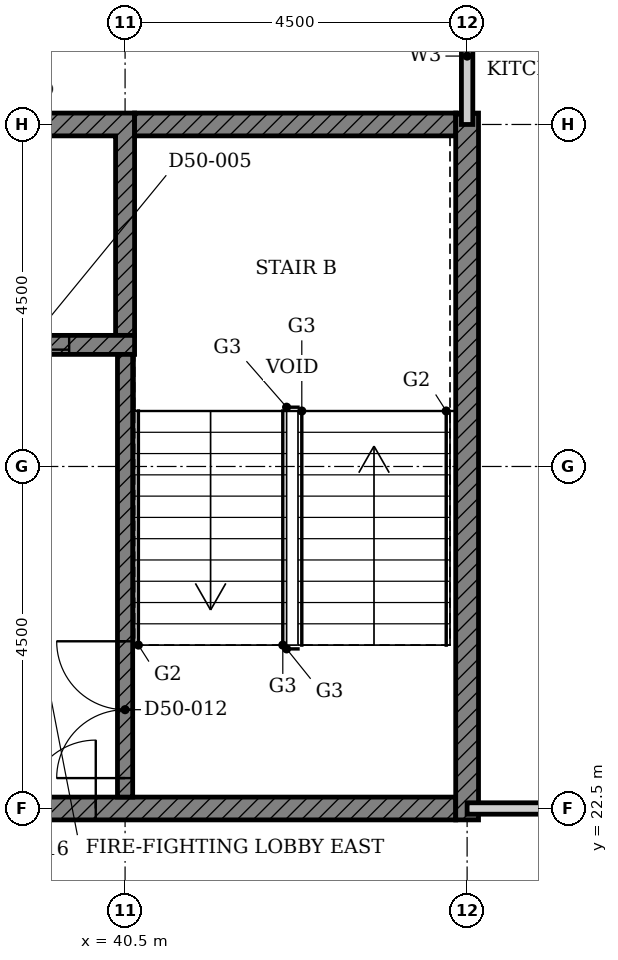
"""IFC4 building model, lengths in metres.
Left out: names, types, materials, properties, quantities, classifications, styles, units other than length and angle.
Written with IfcOpenShell. Run it as: python <this file> out.ifc"""

import sys

from ifc_helpers import new_model, si_unit, direction, frame, frame_2d, origin, place, context, subcontext, project, spatial, polyline, rectangle, outline, extrude, element, fill, save


model = new_model("IFC4")
c1 = context("Model", 3, precision=1e-05, world=origin(), true_north=direction((0.0, 1.0)))
c2 = subcontext(c1, "Body", "Model", "MODEL_VIEW")
j1 = project(units=[si_unit("LENGTHUNIT", "METRE"), si_unit("PLANEANGLEUNIT", "RADIAN")], contexts=[c1])
p1 = place(None, origin())
s1 = spatial("IfcSite", under=j1, at=p1, CompositionType="ELEMENT")
p2 = place(p1, origin())
s2 = spatial("IfcBuilding", under=s1, at=p2, CompositionType="ELEMENT")
p3 = place(p2, frame((0.0, 0.0, 199.8)))
s3 = spatial("IfcBuildingStorey", under=s2, at=p3, CompositionType="ELEMENT", Elevation=199.8)
p4 = place(p3, origin())
e1 = element("IfcWall", 1, at=p4, inside=s3, PredefinedType="SHEAR", context=c2, shape_type="SweptSolid", body=[
    extrude(outline(polyline([(35.232, 28.725), (35.482, 28.725), (35.482, 31.35), (37.803, 31.35), (37.803, 28.725), (38.053, 28.725), (38.053, 31.35), (40.375, 31.35), (40.375, 28.725), (40.625, 28.725), (40.625, 31.65), (35.232, 31.65), (35.232, 28.725)])), origin(), (0.0, 0.0, 1.0), 3.4),
])
p5 = place(p3, frame((32.911, 22.5, 0.0), z_axis=(0.0, 0.0, 1.0), x_axis=(1.0, 0.0, 0.0)))
e2 = element("IfcWall", 2, at=p5, inside=s3, PredefinedType="SHEAR", context=c2, shape_type="SweptSolid", body=[
    extrude(rectangle(XDim=11.939, YDim=0.3, at=frame_2d((5.97, 0.0))), origin(), (0.0, 0.0, 1.0), 3.4),
])
p6 = place(p5, frame((5.404, 0.0, 0.0)))
e3 = element("IfcOpeningElement", 3, at=p6, cuts=e2, PredefinedType="OPENING", context=c2, shape_type="SweptSolid", body=[
    extrude(rectangle(XDim=1.8, YDim=2.1, at=frame_2d((0.9, 1.05))), frame((0.0, 0.16, 0.0), z_axis=(0.0, -1.0, 0.0), x_axis=(1.0, 0.0, 0.0)), (0.0, 0.0, 1.0), 0.32),
])
p7 = place(p3, frame((40.625, 31.5, 0.0), z_axis=(0.0, 0.0, 1.0), x_axis=(1.0, 0.0, 0.0)))
e4 = element("IfcWall", 4, at=p7, inside=s3, PredefinedType="SHEAR", context=c2, shape_type="SweptSolid", body=[
    extrude(rectangle(XDim=4.225, YDim=0.3, at=frame_2d((2.113, 0.0))), origin(), (0.0, 0.0, 1.0), 3.4),
])
p8 = place(p3, frame((45.0, 22.35, 0.0), z_axis=(0.0, 0.0, 1.0), x_axis=(0.0, 1.0, 0.0)))
e5 = element("IfcWall", 5, at=p8, inside=s3, PredefinedType="SHEAR", context=c2, shape_type="SweptSolid", body=[
    extrude(rectangle(XDim=9.3, YDim=0.3, at=frame_2d((4.65, 0.0))), origin(), (0.0, 0.0, 1.0), 3.4),
])
p9 = place(p3, frame((24.947, 28.6, 0.0), z_axis=(0.0, 0.0, 1.0), x_axis=(1.0, 0.0, 0.0)))
e6 = element("IfcWall", 6, at=p9, inside=s3, PredefinedType="SHEAR", context=c2, shape_type="SweptSolid", body=[
    extrude(rectangle(XDim=15.678, YDim=0.25, at=frame_2d((7.839, 0.0))), origin(), (0.0, 0.0, 1.0), 3.4),
])
p10 = place(p9, frame((6.004, 0.0, 0.0)))
e7 = element("IfcOpeningElement", 7, at=p10, cuts=e6, PredefinedType="OPENING", context=c2, shape_type="SweptSolid", body=[
    extrude(rectangle(XDim=1.1, YDim=2.1, at=frame_2d((0.55, 1.05))), frame((0.0, 0.135, 0.0), z_axis=(0.0, -1.0, 0.0), x_axis=(1.0, 0.0, 0.0)), (0.0, 0.0, 1.0), 0.27),
])
p11 = place(p9, frame((11.146, 0.0, 0.0)))
e8 = element("IfcOpeningElement", 8, at=p11, cuts=e6, PredefinedType="OPENING", context=c2, shape_type="SweptSolid", body=[
    extrude(rectangle(XDim=1.1, YDim=2.1, at=frame_2d((0.55, 1.05))), frame((0.0, 0.135, 0.0), z_axis=(0.0, -1.0, 0.0), x_axis=(1.0, 0.0, 0.0)), (0.0, 0.0, 1.0), 0.27),
])
p12 = place(p9, frame((13.718, 0.0, 0.0)))
e9 = element("IfcOpeningElement", 9, at=p12, cuts=e6, PredefinedType="OPENING", context=c2, shape_type="SweptSolid", body=[
    extrude(rectangle(XDim=1.1, YDim=2.1, at=frame_2d((0.55, 1.05))), frame((0.0, 0.135, 0.0), z_axis=(0.0, -1.0, 0.0), x_axis=(1.0, 0.0, 0.0)), (0.0, 0.0, 1.0), 0.27),
])
p13 = place(p9, frame((0.961, 0.0, 0.0)))
e10 = element("IfcOpeningElement", 10, at=p13, cuts=e6, PredefinedType="OPENING", context=c2, shape_type="SweptSolid", body=[
    extrude(rectangle(XDim=0.9, YDim=2.1, at=frame_2d((0.45, 1.05))), frame((0.0, 0.135, 0.0), z_axis=(0.0, -1.0, 0.0), x_axis=(1.0, 0.0, 0.0)), (0.0, 0.0, 1.0), 0.27),
])
p14 = place(p9, frame((8.675, 0.0, 0.0)))
e11 = element("IfcOpeningElement", 11, at=p14, cuts=e6, PredefinedType="OPENING", context=c2, shape_type="SweptSolid", body=[
    extrude(rectangle(XDim=0.9, YDim=2.1, at=frame_2d((0.45, 1.05))), frame((0.0, 0.135, 0.0), z_axis=(0.0, -1.0, 0.0), x_axis=(1.0, 0.0, 0.0)), (0.0, 0.0, 1.0), 0.27),
])
p15 = place(p3, frame((40.5, 22.65, 0.0), z_axis=(0.0, 0.0, 1.0), x_axis=(0.0, 1.0, 0.0)))
e12 = element("IfcWall", 12, at=p15, inside=s3, PredefinedType="SHEAR", context=c2, shape_type="SweptSolid", body=[
    extrude(rectangle(XDim=5.825, YDim=0.2, at=frame_2d((2.913, 0.0))), origin(), (0.0, 0.0, 1.0), 3.4),
])
p16 = place(p15, frame((0.25, 0.0, 0.0)))
e13 = element("IfcOpeningElement", 13, at=p16, cuts=e12, PredefinedType="OPENING", context=c2, shape_type="SweptSolid", body=[
    extrude(rectangle(XDim=1.8, YDim=2.1, at=frame_2d((0.9, 1.05))), frame((0.0, 0.11, 0.0), z_axis=(0.0, -1.0, 0.0), x_axis=(1.0, 0.0, 0.0)), (0.0, 0.0, 1.0), 0.22),
])
p17 = place(p3, frame((45.0, 22.5, 0.0), z_axis=(0.0, 0.0, 1.0), x_axis=(1.0, 0.0, 0.0)))
e14 = element("IfcWall", 14, at=p17, inside=s3, PredefinedType="PARTITIONING", context=c2, shape_type="SweptSolid", body=[
    extrude(rectangle(XDim=4.79, YDim=0.15, at=frame_2d((2.395, 0.0))), origin(), (0.0, 0.0, 1.0), 3.4),
])
p18 = place(p17, frame((1.75, 0.0, 0.0)))
e15 = element("IfcOpeningElement", 15, at=p18, cuts=e14, PredefinedType="OPENING", context=c2, shape_type="SweptSolid", body=[
    extrude(rectangle(XDim=1.0, YDim=2.2, at=frame_2d((0.5, 1.1))), frame((0.0, 0.085, 0.0), z_axis=(0.0, -1.0, 0.0), x_axis=(1.0, 0.0, 0.0)), (0.0, 0.0, 1.0), 0.17),
])
p19 = place(p3, frame((45.0, 31.5, 0.0), z_axis=(0.0, 0.0, 1.0), x_axis=(0.0, 1.0, 0.0)))
e16 = element("IfcWall", 16, at=p19, inside=s3, PredefinedType="PARTITIONING", context=c2, shape_type="SweptSolid", body=[
    extrude(rectangle(XDim=1.8, YDim=0.15, at=frame_2d((0.9, 0.0))), origin(), (0.0, 0.0, 1.0), 3.4),
])
p20 = place(p12, origin())
e17 = element("IfcDoor", 17, at=p20, inside=s3, OperationType="DOUBLE_DOOR_SLIDING", PredefinedType="DOOR", context=c2, shape_type="SweptSolid", body=[
    extrude(rectangle(XDim=1.1, YDim=2.1, at=frame_2d((0.55, 1.05))), frame((0.0, 0.025, 0.0), z_axis=(0.0, -1.0, 0.0), x_axis=(1.0, 0.0, 0.0)), (0.0, 0.0, 1.0), 0.05),
])
fill(e9, e17)
p21 = place(p16, origin())
e18 = element("IfcDoor", 18, at=p21, inside=s3, OperationType="DOUBLE_DOOR_SINGLE_SWING", PredefinedType="DOOR", context=c2, shape_type="SweptSolid", body=[
    extrude(rectangle(XDim=1.8, YDim=2.1, at=frame_2d((0.9, 1.05))), frame((0.0, 0.025, 0.0), z_axis=(0.0, -1.0, 0.0), x_axis=(1.0, 0.0, 0.0)), (0.0, 0.0, 1.0), 0.05),
])
fill(e13, e18)
p22 = place(p6, origin())
e19 = element("IfcDoor", 19, at=p22, inside=s3, OperationType="DOUBLE_DOOR_SINGLE_SWING", PredefinedType="DOOR", context=c2, shape_type="SweptSolid", body=[
    extrude(rectangle(XDim=1.8, YDim=2.1, at=frame_2d((0.9, 1.05))), frame((0.0, 0.025, 0.0), z_axis=(0.0, -1.0, 0.0), x_axis=(1.0, 0.0, 0.0)), (0.0, 0.0, 1.0), 0.05),
])
fill(e3, e19)
save(model, sys.argv[1])
